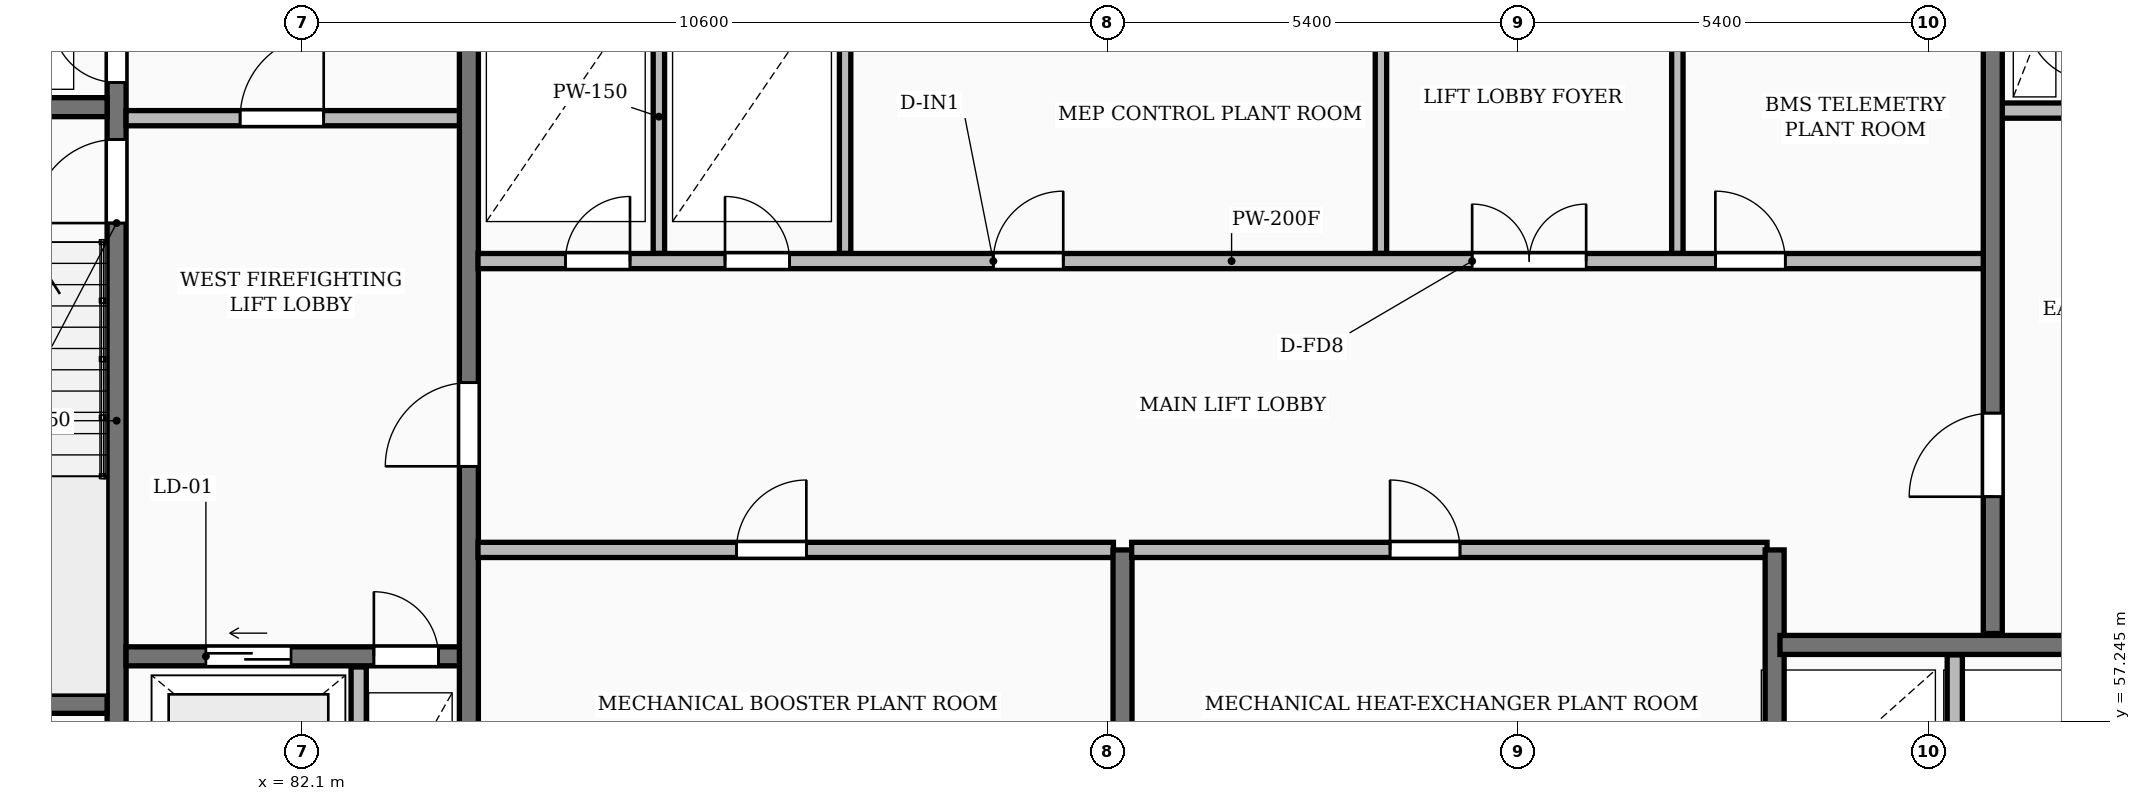
"""IFC4 building model, lengths in metres.
Left out: names, types, materials, properties, quantities, classifications, styles, units other than length and angle.
Written with IfcOpenShell. Run it as: python <this file> out.ifc"""

import sys

from ifc_helpers import new_model, si_unit, direction, frame, frame_2d, origin, place, context, subcontext, project, spatial, rectangle, extrude, element, fill, save


model = new_model("IFC4")
c1 = context("Model", 3, precision=1e-05, world=origin(), true_north=direction((0.0, 1.0)))
c2 = subcontext(c1, "Body", "Model", "MODEL_VIEW")
j1 = project(units=[si_unit("LENGTHUNIT", "METRE"), si_unit("PLANEANGLEUNIT", "RADIAN")], contexts=[c1])
p1 = place(None, origin())
s1 = spatial("IfcSite", under=j1, at=p1, CompositionType="ELEMENT")
p2 = place(p1, origin())
s2 = spatial("IfcBuilding", under=s1, at=p2, CompositionType="ELEMENT")
p3 = place(p2, frame((0.0, 0.0, 259.7)))
s3 = spatial("IfcBuildingStorey", under=s2, at=p3, CompositionType="ELEMENT", Elevation=259.7)
p4 = place(p3, frame((79.665, 55.4, 0.0), z_axis=(0.0, 0.0, 1.0), x_axis=(0.0, 1.0, 0.0)))
e1 = element("IfcWall", 1, at=p4, inside=s3, PredefinedType="SHEAR", context=c2, shape_type="SweptSolid", body=[
    extrude(rectangle(XDim=11.6, YDim=0.25, at=frame_2d((5.8, 0.0))), origin(), (0.0, 0.0, 1.0), 4.5),
])
p5 = place(p4, frame((0.55, 0.0, 0.0)))
e2 = element("IfcOpeningElement", 2, at=p5, cuts=e1, PredefinedType="OPENING", context=c2, shape_type="SweptSolid", body=[
    extrude(rectangle(XDim=0.85, YDim=2.05, at=frame_2d((0.425, 1.025))), frame((0.0, 0.135, 0.0), z_axis=(0.0, -1.0, 0.0), x_axis=(1.0, 0.0, 0.0)), (0.0, 0.0, 1.0), 0.27),
])
p6 = place(p4, frame((8.4, 0.0, 0.0)))
e3 = element("IfcOpeningElement", 3, at=p6, cuts=e1, PredefinedType="OPENING", context=c2, shape_type="SweptSolid", body=[
    extrude(rectangle(XDim=1.1, YDim=2.1, at=frame_2d((0.55, 1.05))), frame((0.0, 0.135, 0.0), z_axis=(0.0, -1.0, 0.0), x_axis=(1.0, 0.0, 0.0)), (0.0, 0.0, 1.0), 0.27),
])
p7 = place(p4, frame((10.25, 0.0, 0.0)))
e4 = element("IfcOpeningElement", 4, at=p7, cuts=e1, PredefinedType="OPENING", context=c2, shape_type="SweptSolid", body=[
    extrude(rectangle(XDim=0.85, YDim=2.05, at=frame_2d((0.425, 1.025))), frame((0.0, 0.135, 0.0), z_axis=(0.0, -1.0, 0.0), x_axis=(1.0, 0.0, 0.0)), (0.0, 0.0, 1.0), 0.27),
])
for number, where, z_axis, x_axis in (
    (5, (76.3, 57.475, 0.0), (0.0, 0.0, 1.0), (1.0, 0.0, 0.0)),
    (6, (76.3, 65.325, 0.0), (0.0, 0.0, 1.0), (1.0, 0.0, 0.0)),
):
    element("IfcWall", number, at=place(p3, frame(where, z_axis=z_axis, x_axis=x_axis)), inside=s3, PredefinedType="SHEAR", context=c2, shape_type="SweptSolid", body=[
        extrude(rectangle(XDim=3.24, YDim=0.25, at=frame_2d((1.62, 0.0))), origin(), (0.0, 0.0, 1.0), 4.5),
    ])
p8 = place(p3, frame((79.79, 58.1, 0.0), z_axis=(0.0, 0.0, 1.0), x_axis=(1.0, 0.0, 0.0)))
e7 = element("IfcWall", 7, at=p8, inside=s3, PredefinedType="SHEAR", context=c2, shape_type="SweptSolid", body=[
    extrude(rectangle(XDim=4.39, YDim=0.25, at=frame_2d((2.195, 0.0))), origin(), (0.0, 0.0, 1.0), 4.5),
])
p9 = place(p8, frame((1.05, 0.0, 0.0)))
e8 = element("IfcOpeningElement", 8, at=p9, cuts=e7, PredefinedType="OPENING", context=c2, shape_type="SweptSolid", body=[
    extrude(rectangle(XDim=1.12, YDim=2.12, at=frame_2d((0.56, 1.06))), frame((0.0, 0.135, 0.0), z_axis=(0.0, -1.0, 0.0), x_axis=(1.0, 0.0, 0.0)), (0.0, 0.0, 1.0), 0.27),
])
p10 = place(p8, frame((3.26, 0.0, 0.0)))
e9 = element("IfcOpeningElement", 9, at=p10, cuts=e7, PredefinedType="OPENING", context=c2, shape_type="SweptSolid", body=[
    extrude(rectangle(XDim=0.85, YDim=2.05, at=frame_2d((0.425, 1.025))), frame((0.0, 0.135, 0.0), z_axis=(0.0, -1.0, 0.0), x_axis=(1.0, 0.0, 0.0)), (0.0, 0.0, 1.0), 0.27),
])
p11 = place(p3, frame((82.85, 55.4, 0.0), z_axis=(0.0, 0.0, 1.0), x_axis=(0.0, 1.0, 0.0)))
e10 = element("IfcWall", 10, at=p11, inside=s3, PredefinedType="PARTITIONING", context=c2, shape_type="SweptSolid", body=[
    extrude(rectangle(XDim=2.56, YDim=0.2, at=frame_2d((1.28, 0.0))), origin(), (0.0, 0.0, 1.0), 4.23),
])
p12 = place(p3, frame((79.79, 65.18, 0.0), z_axis=(0.0, 0.0, 1.0), x_axis=(1.0, 0.0, 0.0)))
e11 = element("IfcWall", 11, at=p12, inside=s3, PredefinedType="PARTITIONING", context=c2, shape_type="SweptSolid", body=[
    extrude(rectangle(XDim=4.39, YDim=0.2, at=frame_2d((2.195, 0.0))), origin(), (0.0, 0.0, 1.0), 4.23),
])
p13 = place(p12, frame((1.5, 0.0, 0.0)))
e12 = element("IfcOpeningElement", 12, at=p13, cuts=e11, PredefinedType="OPENING", context=c2, shape_type="SweptSolid", body=[
    extrude(rectangle(XDim=1.1, YDim=2.1, at=frame_2d((0.55, 1.05))), frame((0.0, 0.11, 0.0), z_axis=(0.0, -1.0, 0.0), x_axis=(1.0, 0.0, 0.0)), (0.0, 0.0, 1.0), 0.22),
])
p14 = place(p3, frame((84.3, 55.4, 0.0), z_axis=(0.0, 0.0, 1.0), x_axis=(0.0, 1.0, 0.0)))
e13 = element("IfcWall", 13, at=p14, inside=s3, PredefinedType="SHEAR", context=c2, shape_type="SweptSolid", body=[
    extrude(rectangle(XDim=11.6, YDim=0.25, at=frame_2d((5.8, 0.0))), origin(), (0.0, 0.0, 1.0), 4.5),
])
p15 = place(p14, frame((5.2, 0.0, 0.0)))
e14 = element("IfcOpeningElement", 14, at=p15, cuts=e13, PredefinedType="OPENING", context=c2, shape_type="SweptSolid", body=[
    extrude(rectangle(XDim=1.1, YDim=2.1, at=frame_2d((0.55, 1.05))), frame((0.0, 0.135, 0.0), z_axis=(0.0, -1.0, 0.0), x_axis=(1.0, 0.0, 0.0)), (0.0, 0.0, 1.0), 0.27),
])
p16 = place(p3, frame((84.42, 59.5, 0.0), z_axis=(0.0, 0.0, 1.0), x_axis=(1.0, 0.0, 0.0)))
e15 = element("IfcWall", 15, at=p16, inside=s3, PredefinedType="PARTITIONING", context=c2, shape_type="SweptSolid", body=[
    extrude(rectangle(XDim=8.36, YDim=0.2, at=frame_2d((4.18, 0.0))), origin(), (0.0, 0.0, 1.0), 4.23),
])
p17 = place(p16, frame((3.4, 0.0, 0.0)))
e16 = element("IfcOpeningElement", 16, at=p17, cuts=e15, PredefinedType="OPENING", context=c2, shape_type="SweptSolid", body=[
    extrude(rectangle(XDim=0.92, YDim=2.08, at=frame_2d((0.46, 1.04))), frame((0.0, 0.11, 0.0), z_axis=(0.0, -1.0, 0.0), x_axis=(1.0, 0.0, 0.0)), (0.0, 0.0, 1.0), 0.22),
])
p18 = place(p3, frame((92.9, 55.4, 0.0), z_axis=(0.0, 0.0, 1.0), x_axis=(0.0, 1.0, 0.0)))
e17 = element("IfcWall", 17, at=p18, inside=s3, PredefinedType="SHEAR", context=c2, shape_type="SweptSolid", body=[
    extrude(rectangle(XDim=4.1, YDim=0.25, at=frame_2d((2.05, 0.0))), origin(), (0.0, 0.0, 1.0), 4.5),
])
p19 = place(p3, frame((93.02, 59.5, 0.0), z_axis=(0.0, 0.0, 1.0), x_axis=(1.0, 0.0, 0.0)))
e18 = element("IfcWall", 18, at=p19, inside=s3, PredefinedType="PARTITIONING", context=c2, shape_type="SweptSolid", body=[
    extrude(rectangle(XDim=8.36, YDim=0.2, at=frame_2d((4.18, 0.0))), origin(), (0.0, 0.0, 1.0), 4.23),
])
p20 = place(p19, frame((3.4, 0.0, 0.0)))
e19 = element("IfcOpeningElement", 19, at=p20, cuts=e18, PredefinedType="OPENING", context=c2, shape_type="SweptSolid", body=[
    extrude(rectangle(XDim=0.92, YDim=2.08, at=frame_2d((0.46, 1.04))), frame((0.0, 0.11, 0.0), z_axis=(0.0, -1.0, 0.0), x_axis=(1.0, 0.0, 0.0)), (0.0, 0.0, 1.0), 0.22),
])
p21 = place(p3, frame((101.48, 55.4, 0.0), z_axis=(0.0, 0.0, 1.0), x_axis=(0.0, 1.0, 0.0)))
e20 = element("IfcWall", 20, at=p21, inside=s3, PredefinedType="SHEAR", context=c2, shape_type="SweptSolid", body=[
    extrude(rectangle(XDim=4.1, YDim=0.25, at=frame_2d((2.05, 0.0))), origin(), (0.0, 0.0, 1.0), 4.5),
])
p22 = place(p3, frame((103.85, 55.4, 0.0), z_axis=(0.0, 0.0, 1.0), x_axis=(0.0, 1.0, 0.0)))
e21 = element("IfcWall", 21, at=p22, inside=s3, PredefinedType="PARTITIONING", context=c2, shape_type="SweptSolid", body=[
    extrude(rectangle(XDim=2.72, YDim=0.2, at=frame_2d((1.36, 0.0))), origin(), (0.0, 0.0, 1.0), 4.23),
])
p23 = place(p3, frame((101.55, 58.25, 0.0), z_axis=(0.0, 0.0, 1.0), x_axis=(1.0, 0.0, 0.0)))
e22 = element("IfcWall", 22, at=p23, inside=s3, PredefinedType="SHEAR", context=c2, shape_type="SweptSolid", body=[
    extrude(rectangle(XDim=4.6, YDim=0.25, at=frame_2d((2.3, 0.0))), origin(), (0.0, 0.0, 1.0), 4.5),
])
for number, where, z_axis, x_axis in (
    (23, (86.8, 63.4, 0.0), (0.0, 0.0, 1.0), (0.0, 1.0, 0.0)),
    (24, (89.25, 63.4, 0.0), (0.0, 0.0, 1.0), (0.0, 1.0, 0.0)),
    (25, (96.3, 63.4, 0.0), (0.0, 0.0, 1.0), (0.0, 1.0, 0.0)),
    (26, (100.2, 63.4, 0.0), (0.0, 0.0, 1.0), (0.0, 1.0, 0.0)),
):
    element("IfcWall", number, at=place(p3, frame(where, z_axis=z_axis, x_axis=x_axis)), inside=s3, PredefinedType="PARTITIONING", context=c2, shape_type="SweptSolid", body=[
        extrude(rectangle(XDim=3.6, YDim=0.15, at=frame_2d((1.8, 0.0))), origin(), (0.0, 0.0, 1.0), 4.23),
    ])
p24 = place(p3, frame((84.42, 63.3, 0.0), z_axis=(0.0, 0.0, 1.0), x_axis=(1.0, 0.0, 0.0)))
e27 = element("IfcWall", 27, at=p24, inside=s3, PredefinedType="PARTITIONING", context=c2, shape_type="SweptSolid", body=[
    extrude(rectangle(XDim=19.83, YDim=0.2, at=frame_2d((9.915, 0.0))), origin(), (0.0, 0.0, 1.0), 4.23),
])
p25 = place(p24, frame((1.15, 0.0, 0.0)))
e28 = element("IfcOpeningElement", 28, at=p25, cuts=e27, PredefinedType="OPENING", context=c2, shape_type="SweptSolid", body=[
    extrude(rectangle(XDim=0.85, YDim=2.05, at=frame_2d((0.425, 1.025))), frame((0.0, 0.11, 0.0), z_axis=(0.0, -1.0, 0.0), x_axis=(1.0, 0.0, 0.0)), (0.0, 0.0, 1.0), 0.22),
])
p26 = place(p24, frame((3.25, 0.0, 0.0)))
e29 = element("IfcOpeningElement", 29, at=p26, cuts=e27, PredefinedType="OPENING", context=c2, shape_type="SweptSolid", body=[
    extrude(rectangle(XDim=0.85, YDim=2.05, at=frame_2d((0.425, 1.025))), frame((0.0, 0.11, 0.0), z_axis=(0.0, -1.0, 0.0), x_axis=(1.0, 0.0, 0.0)), (0.0, 0.0, 1.0), 0.22),
])
p27 = place(p24, frame((13.08, 0.0, 0.0)))
e30 = element("IfcOpeningElement", 30, at=p27, cuts=e27, PredefinedType="OPENING", context=c2, shape_type="SweptSolid", body=[
    extrude(rectangle(XDim=1.5, YDim=2.2, at=frame_2d((0.75, 1.1))), frame((0.0, 0.11, 0.0), z_axis=(0.0, -1.0, 0.0), x_axis=(1.0, 0.0, 0.0)), (0.0, 0.0, 1.0), 0.22),
])
p28 = place(p24, frame((6.78, 0.0, 0.0)))
e31 = element("IfcOpeningElement", 31, at=p28, cuts=e27, PredefinedType="OPENING", context=c2, shape_type="SweptSolid", body=[
    extrude(rectangle(XDim=0.92, YDim=2.08, at=frame_2d((0.46, 1.04))), frame((0.0, 0.11, 0.0), z_axis=(0.0, -1.0, 0.0), x_axis=(1.0, 0.0, 0.0)), (0.0, 0.0, 1.0), 0.22),
])
p29 = place(p24, frame((16.28, 0.0, 0.0)))
e32 = element("IfcOpeningElement", 32, at=p29, cuts=e27, PredefinedType="OPENING", context=c2, shape_type="SweptSolid", body=[
    extrude(rectangle(XDim=0.92, YDim=2.08, at=frame_2d((0.46, 1.04))), frame((0.0, 0.11, 0.0), z_axis=(0.0, -1.0, 0.0), x_axis=(1.0, 0.0, 0.0)), (0.0, 0.0, 1.0), 0.22),
])
p30 = place(p3, frame((104.45, 65.28, 0.0), z_axis=(0.0, 0.0, 1.0), x_axis=(1.0, 0.0, 0.0)))
e33 = element("IfcWall", 33, at=p30, inside=s3, PredefinedType="PARTITIONING", context=c2, shape_type="SweptSolid", body=[
    extrude(rectangle(XDim=1.2, YDim=0.2, at=frame_2d((0.6, 0.0))), origin(), (0.0, 0.0, 1.0), 4.23),
])
p31 = place(p3, frame((104.35, 58.4, 0.0), z_axis=(0.0, 0.0, 1.0), x_axis=(0.0, 1.0, 0.0)))
e34 = element("IfcWall", 34, at=p31, inside=s3, PredefinedType="SHEAR", context=c2, shape_type="SweptSolid", body=[
    extrude(rectangle(XDim=8.6, YDim=0.25, at=frame_2d((4.3, 0.0))), origin(), (0.0, 0.0, 1.0), 4.5),
])
p32 = place(p31, frame((1.8, 0.0, 0.0)))
e35 = element("IfcOpeningElement", 35, at=p32, cuts=e34, PredefinedType="OPENING", context=c2, shape_type="SweptSolid", body=[
    extrude(rectangle(XDim=1.1, YDim=2.1, at=frame_2d((0.55, 1.05))), frame((0.0, 0.135, 0.0), z_axis=(0.0, -1.0, 0.0), x_axis=(1.0, 0.0, 0.0)), (0.0, 0.0, 1.0), 0.27),
])
p33 = place(p6, origin())
e36 = element("IfcDoor", 36, at=p33, inside=s3, OperationType="SINGLE_SWING_LEFT", PredefinedType="DOOR", context=c2, shape_type="SweptSolid", body=[
    extrude(rectangle(XDim=1.1, YDim=2.1, at=frame_2d((0.55, 1.05))), frame((0.0, 0.025, 0.0), z_axis=(0.0, -1.0, 0.0), x_axis=(1.0, 0.0, 0.0)), (0.0, 0.0, 1.0), 0.05),
])
fill(e3, e36)
p34 = place(p7, origin())
e37 = element("IfcDoor", 37, at=p34, inside=s3, OperationType="SINGLE_SWING_RIGHT", PredefinedType="DOOR", context=c2, shape_type="SweptSolid", body=[
    extrude(rectangle(XDim=0.85, YDim=2.05, at=frame_2d((0.425, 1.025))), frame((0.0, 0.025, 0.0), z_axis=(0.0, -1.0, 0.0), x_axis=(1.0, 0.0, 0.0)), (0.0, 0.0, 1.0), 0.05),
])
fill(e4, e37)
p35 = place(p9, origin())
e38 = element("IfcDoor", 38, at=p35, inside=s3, OperationType="SLIDING_TO_LEFT", PredefinedType="DOOR", context=c2, shape_type="SweptSolid", body=[
    extrude(rectangle(XDim=1.12, YDim=2.12, at=frame_2d((0.56, 1.06))), frame((0.0, 0.025, 0.0), z_axis=(0.0, -1.0, 0.0), x_axis=(1.0, 0.0, 0.0)), (0.0, 0.0, 1.0), 0.05),
])
fill(e8, e38)
p36 = place(p10, origin())
e39 = element("IfcDoor", 39, at=p36, inside=s3, OperationType="SINGLE_SWING_LEFT", PredefinedType="DOOR", context=c2, shape_type="SweptSolid", body=[
    extrude(rectangle(XDim=0.85, YDim=2.05, at=frame_2d((0.425, 1.025))), frame((0.0, 0.025, 0.0), z_axis=(0.0, -1.0, 0.0), x_axis=(1.0, 0.0, 0.0)), (0.0, 0.0, 1.0), 0.05),
])
fill(e9, e39)
p37 = place(p13, origin())
e40 = element("IfcDoor", 40, at=p37, inside=s3, OperationType="SINGLE_SWING_RIGHT", PredefinedType="DOOR", context=c2, shape_type="SweptSolid", body=[
    extrude(rectangle(XDim=1.1, YDim=2.1, at=frame_2d((0.55, 1.05))), frame((0.0, 0.025, 0.0), z_axis=(0.0, -1.0, 0.0), x_axis=(1.0, 0.0, 0.0)), (0.0, 0.0, 1.0), 0.05),
])
fill(e12, e40)
p38 = place(p15, origin())
e41 = element("IfcDoor", 41, at=p38, inside=s3, OperationType="SINGLE_SWING_LEFT", PredefinedType="DOOR", context=c2, shape_type="SweptSolid", body=[
    extrude(rectangle(XDim=1.1, YDim=2.1, at=frame_2d((0.55, 1.05))), frame((0.0, 0.025, 0.0), z_axis=(0.0, -1.0, 0.0), x_axis=(1.0, 0.0, 0.0)), (0.0, 0.0, 1.0), 0.05),
])
fill(e14, e41)
p39 = place(p17, origin())
e42 = element("IfcDoor", 42, at=p39, inside=s3, OperationType="SINGLE_SWING_RIGHT", PredefinedType="DOOR", context=c2, shape_type="SweptSolid", body=[
    extrude(rectangle(XDim=0.92, YDim=2.08, at=frame_2d((0.46, 1.04))), frame((0.0, 0.025, 0.0), z_axis=(0.0, -1.0, 0.0), x_axis=(1.0, 0.0, 0.0)), (0.0, 0.0, 1.0), 0.05),
])
fill(e16, e42)
p40 = place(p20, origin())
e43 = element("IfcDoor", 43, at=p40, inside=s3, OperationType="SINGLE_SWING_LEFT", PredefinedType="DOOR", context=c2, shape_type="SweptSolid", body=[
    extrude(rectangle(XDim=0.92, YDim=2.08, at=frame_2d((0.46, 1.04))), frame((0.0, 0.025, 0.0), z_axis=(0.0, -1.0, 0.0), x_axis=(1.0, 0.0, 0.0)), (0.0, 0.0, 1.0), 0.05),
])
fill(e19, e43)
p41 = place(p25, origin())
e44 = element("IfcDoor", 44, at=p41, inside=s3, OperationType="SINGLE_SWING_RIGHT", PredefinedType="DOOR", context=c2, shape_type="SweptSolid", body=[
    extrude(rectangle(XDim=0.85, YDim=2.05, at=frame_2d((0.425, 1.025))), frame((0.0, 0.025, 0.0), z_axis=(0.0, -1.0, 0.0), x_axis=(1.0, 0.0, 0.0)), (0.0, 0.0, 1.0), 0.05),
])
fill(e28, e44)
p42 = place(p26, origin())
e45 = element("IfcDoor", 45, at=p42, inside=s3, OperationType="SINGLE_SWING_LEFT", PredefinedType="DOOR", context=c2, shape_type="SweptSolid", body=[
    extrude(rectangle(XDim=0.85, YDim=2.05, at=frame_2d((0.425, 1.025))), frame((0.0, 0.025, 0.0), z_axis=(0.0, -1.0, 0.0), x_axis=(1.0, 0.0, 0.0)), (0.0, 0.0, 1.0), 0.05),
])
fill(e29, e45)
p43 = place(p27, origin())
e46 = element("IfcDoor", 46, at=p43, inside=s3, OperationType="DOUBLE_DOOR_SINGLE_SWING", PredefinedType="DOOR", context=c2, shape_type="SweptSolid", body=[
    extrude(rectangle(XDim=1.5, YDim=2.2, at=frame_2d((0.75, 1.1))), frame((0.0, 0.025, 0.0), z_axis=(0.0, -1.0, 0.0), x_axis=(1.0, 0.0, 0.0)), (0.0, 0.0, 1.0), 0.05),
])
fill(e30, e46)
p44 = place(p28, origin())
e47 = element("IfcDoor", 47, at=p44, inside=s3, OperationType="SINGLE_SWING_RIGHT", PredefinedType="DOOR", context=c2, shape_type="SweptSolid", body=[
    extrude(rectangle(XDim=0.92, YDim=2.08, at=frame_2d((0.46, 1.04))), frame((0.0, 0.025, 0.0), z_axis=(0.0, -1.0, 0.0), x_axis=(1.0, 0.0, 0.0)), (0.0, 0.0, 1.0), 0.05),
])
fill(e31, e47)
p45 = place(p29, origin())
e48 = element("IfcDoor", 48, at=p45, inside=s3, OperationType="SINGLE_SWING_LEFT", PredefinedType="DOOR", context=c2, shape_type="SweptSolid", body=[
    extrude(rectangle(XDim=0.92, YDim=2.08, at=frame_2d((0.46, 1.04))), frame((0.0, 0.025, 0.0), z_axis=(0.0, -1.0, 0.0), x_axis=(1.0, 0.0, 0.0)), (0.0, 0.0, 1.0), 0.05),
])
fill(e32, e48)
p46 = place(p32, origin())
e49 = element("IfcDoor", 49, at=p46, inside=s3, OperationType="SINGLE_SWING_LEFT", PredefinedType="DOOR", context=c2, shape_type="SweptSolid", body=[
    extrude(rectangle(XDim=1.1, YDim=2.1, at=frame_2d((0.55, 1.05))), frame((0.0, 0.025, 0.0), z_axis=(0.0, -1.0, 0.0), x_axis=(1.0, 0.0, 0.0)), (0.0, 0.0, 1.0), 0.05),
])
fill(e35, e49)
save(model, sys.argv[1])
